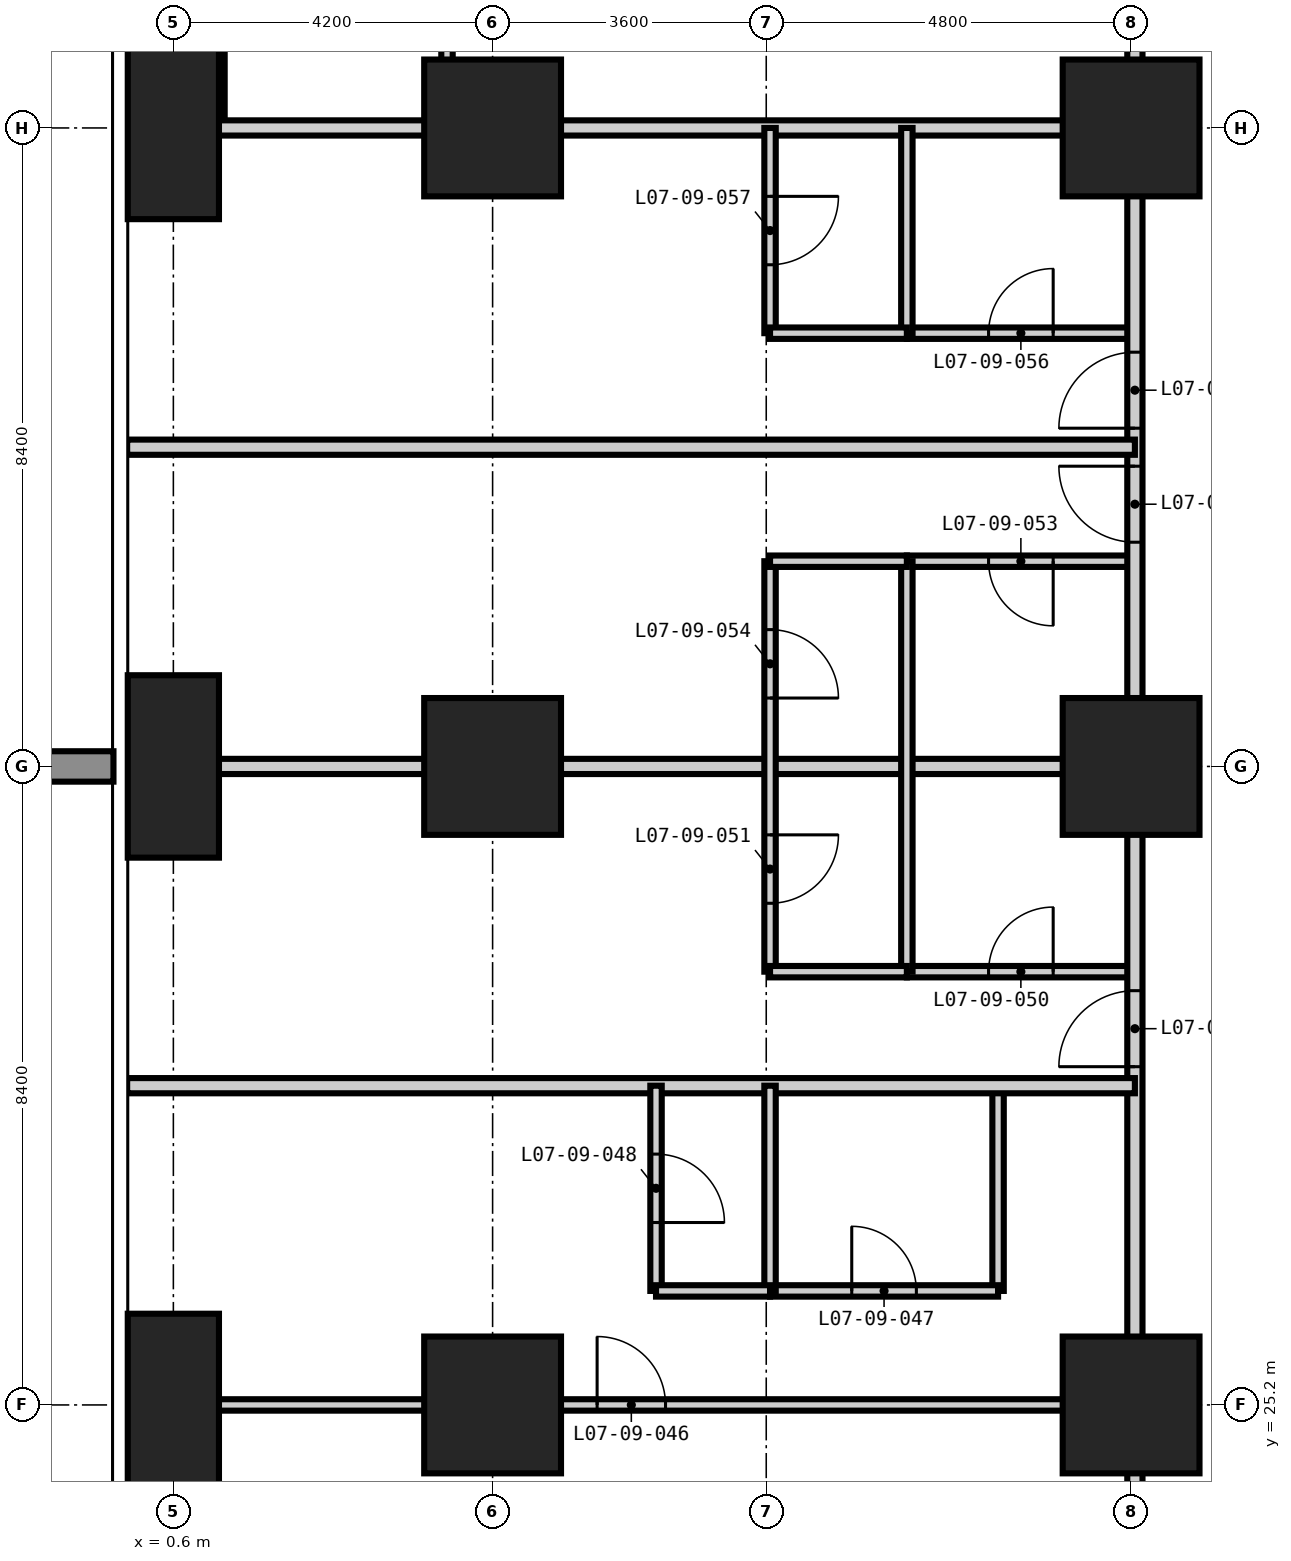
"""IFC4 building model, lengths in metres.
Left out: names, types, materials, properties, quantities, classifications, styles, units other than length and angle.
Written with IfcOpenShell. Run it as: python <this file> out.ifc"""

import sys

from ifc_helpers import new_model, si_unit, direction, frame, frame_2d, origin, origin_2d, place, context, subcontext, project, spatial, rectangle, extrude, element, fill, save


model = new_model("IFC4")
c1 = context("Model", 3, precision=1e-05, world=origin(), true_north=direction((0.0, 1.0)))
c2 = subcontext(c1, "Body", "Model", "MODEL_VIEW")
j1 = project(units=[si_unit("LENGTHUNIT", "METRE"), si_unit("PLANEANGLEUNIT", "RADIAN")], contexts=[c1])
p1 = place(None, origin())
s1 = spatial("IfcSite", under=j1, at=p1, CompositionType="ELEMENT")
p2 = place(p1, origin())
s2 = spatial("IfcBuilding", under=s1, at=p2, CompositionType="ELEMENT")
p3 = place(p2, frame((0.0, 0.0, 34.2)))
s3 = spatial("IfcBuildingStorey", under=s2, at=p3, CompositionType="ELEMENT", Elevation=34.2)
for number, where, z_axis, x_axis in (
    (1, (0.6, 25.2, -0.35), (0.0, 0.0, 1.0), (1.0, 0.0, 0.0)),
    (2, (0.6, 33.6, -0.35), (0.0, 0.0, 1.0), (1.0, 0.0, 0.0)),
    (3, (0.6, 42.0, -0.35), (0.0, 0.0, 1.0), (1.0, 0.0, 0.0)),
):
    element("IfcColumn", number, at=place(p3, frame(where, z_axis=z_axis, x_axis=x_axis)), inside=s3, PredefinedType="COLUMN", context=c2, shape_type="SweptSolid", body=[
        extrude(rectangle(XDim=1.2, YDim=2.4, at=origin_2d()), origin(), (0.0, 0.0, 1.0), 3.6),
    ])
for number, where, z_axis, x_axis in (
    (4, (4.8, 25.2, -0.35), (0.0, 0.0, 1.0), (1.0, 0.0, 0.0)),
    (5, (4.8, 33.6, -0.35), (0.0, 0.0, 1.0), (1.0, 0.0, 0.0)),
    (6, (4.8, 42.0, -0.35), (0.0, 0.0, 1.0), (1.0, 0.0, 0.0)),
    (7, (13.2, 25.2, -0.35), (0.0, 0.0, 1.0), (1.0, 0.0, 0.0)),
    (8, (13.2, 33.6, -0.35), (0.0, 0.0, 1.0), (1.0, 0.0, 0.0)),
    (9, (13.2, 42.0, -0.35), (0.0, 0.0, 1.0), (1.0, 0.0, 0.0)),
):
    element("IfcColumn", number, at=place(p3, frame(where, z_axis=z_axis, x_axis=x_axis)), inside=s3, PredefinedType="COLUMN", context=c2, shape_type="SweptSolid", body=[
        extrude(rectangle(XDim=1.8, YDim=1.8, at=origin_2d()), origin(), (0.0, 0.0, 1.0), 3.6),
    ])
p4 = place(p3, frame((1.2, 42.0, 0.0), z_axis=(0.0, 0.0, 1.0), x_axis=(0.0, 1.0, 0.0)))
e10 = element("IfcWall", 10, at=p4, inside=s3, PredefinedType="PARTITIONING", context=c2, shape_type="SweptSolid", body=[
    extrude(rectangle(XDim=3.6, YDim=0.15, at=frame_2d((1.8, 0.0))), origin(), (0.0, 0.0, 1.0), 3.25),
])
p5 = place(p4, frame((1.375, 0.0, 0.0)))
e11 = element("IfcOpeningElement", 11, at=p5, cuts=e10, PredefinedType="OPENING", context=c2, shape_type="SweptSolid", body=[
    extrude(rectangle(XDim=0.85, YDim=2.1, at=frame_2d((0.425, 1.05))), frame((0.0, 0.085, 0.0), z_axis=(0.0, -1.0, 0.0), x_axis=(1.0, 0.0, 0.0)), (0.0, 0.0, 1.0), 0.17),
])
p6 = place(p3, frame((11.45, 26.7, 0.0), z_axis=(0.0, 0.0, 1.0), x_axis=(0.0, 1.0, 0.0)))
e12 = element("IfcWall", 12, at=p6, inside=s3, PredefinedType="PARTITIONING", context=c2, shape_type="SweptSolid", body=[
    extrude(rectangle(XDim=2.7, YDim=0.15, at=frame_2d((1.35, 0.0))), origin(), (0.0, 0.0, 1.0), 3.25),
])
p7 = place(p3, frame((8.45, 26.7, 0.0), z_axis=(0.0, 0.0, 1.0), x_axis=(1.0, 0.0, 0.0)))
e13 = element("IfcWall", 13, at=p7, inside=s3, PredefinedType="PARTITIONING", context=c2, shape_type="SweptSolid", body=[
    extrude(rectangle(XDim=3.0, YDim=0.15, at=frame_2d((1.5, 0.0))), origin(), (0.0, 0.0, 1.0), 3.25),
])
p8 = place(p7, frame((1.075, 0.0, 0.0)))
e14 = element("IfcOpeningElement", 14, at=p8, cuts=e13, PredefinedType="OPENING", context=c2, shape_type="SweptSolid", body=[
    extrude(rectangle(XDim=0.85, YDim=2.1, at=frame_2d((0.425, 1.05))), frame((0.0, 0.085, 0.0), z_axis=(0.0, -1.0, 0.0), x_axis=(1.0, 0.0, 0.0)), (0.0, 0.0, 1.0), 0.17),
])
p9 = place(p3, frame((10.25, 30.9, 0.0), z_axis=(0.0, 0.0, 1.0), x_axis=(1.0, 0.0, 0.0)))
e15 = element("IfcWall", 15, at=p9, inside=s3, PredefinedType="PARTITIONING", context=c2, shape_type="SweptSolid", body=[
    extrude(rectangle(XDim=3.0, YDim=0.15, at=frame_2d((1.5, 0.0))), origin(), (0.0, 0.0, 1.0), 3.25),
])
p10 = place(p9, frame((1.075, 0.0, 0.0)))
e16 = element("IfcOpeningElement", 16, at=p10, cuts=e15, PredefinedType="OPENING", context=c2, shape_type="SweptSolid", body=[
    extrude(rectangle(XDim=0.85, YDim=2.1, at=frame_2d((0.425, 1.05))), frame((0.0, 0.085, 0.0), z_axis=(0.0, -1.0, 0.0), x_axis=(1.0, 0.0, 0.0)), (0.0, 0.0, 1.0), 0.17),
])
p11 = place(p3, frame((10.25, 36.3, 0.0), z_axis=(0.0, 0.0, 1.0), x_axis=(1.0, 0.0, 0.0)))
e17 = element("IfcWall", 17, at=p11, inside=s3, PredefinedType="PARTITIONING", context=c2, shape_type="SweptSolid", body=[
    extrude(rectangle(XDim=3.0, YDim=0.15, at=frame_2d((1.5, 0.0))), origin(), (0.0, 0.0, 1.0), 3.25),
])
p12 = place(p11, frame((1.075, 0.0, 0.0)))
e18 = element("IfcOpeningElement", 18, at=p12, cuts=e17, PredefinedType="OPENING", context=c2, shape_type="SweptSolid", body=[
    extrude(rectangle(XDim=0.85, YDim=2.1, at=frame_2d((0.425, 1.05))), frame((0.0, 0.085, 0.0), z_axis=(0.0, -1.0, 0.0), x_axis=(1.0, 0.0, 0.0)), (0.0, 0.0, 1.0), 0.17),
])
p13 = place(p3, frame((10.25, 39.3, 0.0), z_axis=(0.0, 0.0, 1.0), x_axis=(1.0, 0.0, 0.0)))
e19 = element("IfcWall", 19, at=p13, inside=s3, PredefinedType="PARTITIONING", context=c2, shape_type="SweptSolid", body=[
    extrude(rectangle(XDim=3.0, YDim=0.15, at=frame_2d((1.5, 0.0))), origin(), (0.0, 0.0, 1.0), 3.25),
])
p14 = place(p13, frame((1.075, 0.0, 0.0)))
e20 = element("IfcOpeningElement", 20, at=p14, cuts=e19, PredefinedType="OPENING", context=c2, shape_type="SweptSolid", body=[
    extrude(rectangle(XDim=0.85, YDim=2.1, at=frame_2d((0.425, 1.05))), frame((0.0, 0.085, 0.0), z_axis=(0.0, -1.0, 0.0), x_axis=(1.0, 0.0, 0.0)), (0.0, 0.0, 1.0), 0.17),
])
p15 = place(p3, frame((13.25, 13.25, 0.0), z_axis=(0.0, 0.0, 1.0), x_axis=(0.0, 1.0, 0.0)))
e21 = element("IfcWall", 21, at=p15, inside=s3, PredefinedType="PARTITIONING", context=c2, shape_type="SweptSolid", body=[
    extrude(rectangle(XDim=32.0, YDim=0.2, at=frame_2d((16.0, 0.0))), origin(), (0.0, 0.0, 1.0), 3.25),
])
p16 = place(p15, frame((9.35, 0.0, 0.0)))
e22 = element("IfcOpeningElement", 22, at=p16, cuts=e21, PredefinedType="OPENING", context=c2, shape_type="SweptSolid", body=[
    extrude(rectangle(XDim=1.0, YDim=2.2, at=frame_2d((0.5, 1.1))), frame((0.0, 0.11, 0.0), z_axis=(0.0, -1.0, 0.0), x_axis=(1.0, 0.0, 0.0)), (0.0, 0.0, 1.0), 0.22),
])
p17 = place(p15, frame((16.4, 0.0, 0.0)))
e23 = element("IfcOpeningElement", 23, at=p17, cuts=e21, PredefinedType="OPENING", context=c2, shape_type="SweptSolid", body=[
    extrude(rectangle(XDim=1.0, YDim=2.2, at=frame_2d((0.5, 1.1))), frame((0.0, 0.11, 0.0), z_axis=(0.0, -1.0, 0.0), x_axis=(1.0, 0.0, 0.0)), (0.0, 0.0, 1.0), 0.22),
])
p18 = place(p15, frame((23.3, 0.0, 0.0)))
e24 = element("IfcOpeningElement", 24, at=p18, cuts=e21, PredefinedType="OPENING", context=c2, shape_type="SweptSolid", body=[
    extrude(rectangle(XDim=1.0, YDim=2.2, at=frame_2d((0.5, 1.1))), frame((0.0, 0.11, 0.0), z_axis=(0.0, -1.0, 0.0), x_axis=(1.0, 0.0, 0.0)), (0.0, 0.0, 1.0), 0.22),
])
p19 = place(p15, frame((24.8, 0.0, 0.0)))
e25 = element("IfcOpeningElement", 25, at=p19, cuts=e21, PredefinedType="OPENING", context=c2, shape_type="SweptSolid", body=[
    extrude(rectangle(XDim=1.0, YDim=2.2, at=frame_2d((0.5, 1.1))), frame((0.0, 0.11, 0.0), z_axis=(0.0, -1.0, 0.0), x_axis=(1.0, 0.0, 0.0)), (0.0, 0.0, 1.0), 0.22),
])
p20 = place(p15, frame((1.275, 0.0, 0.0)))
e26 = element("IfcOpeningElement", 26, at=p20, cuts=e21, PredefinedType="OPENING", context=c2, shape_type="SweptSolid", body=[
    extrude(rectangle(XDim=1.0, YDim=2.2, at=frame_2d((0.5, 1.1))), frame((0.0, 0.11, 0.0), z_axis=(0.0, -1.0, 0.0), x_axis=(1.0, 0.0, 0.0)), (0.0, 0.0, 1.0), 0.22),
])
p21 = place(p15, frame((29.875, 0.0, 0.0)))
e27 = element("IfcOpeningElement", 27, at=p21, cuts=e21, PredefinedType="OPENING", context=c2, shape_type="SweptSolid", body=[
    extrude(rectangle(XDim=1.0, YDim=2.2, at=frame_2d((0.5, 1.1))), frame((0.0, 0.11, 0.0), z_axis=(0.0, -1.0, 0.0), x_axis=(1.0, 0.0, 0.0)), (0.0, 0.0, 1.0), 0.22),
])
for number, where, z_axis, x_axis in (
    (28, (-0.008, 29.4, 0.0), (0.0, 0.0, 1.0), (1.0, 0.0, 0.0)),
    (29, (-0.008, 33.6, 0.0), (0.0, 0.0, 1.0), (1.0, 0.0, 0.0)),
    (30, (-0.008, 37.8, 0.0), (0.0, 0.0, 1.0), (1.0, 0.0, 0.0)),
    (31, (-0.008, 42.0, 0.0), (0.0, 0.0, 1.0), (1.0, 0.0, 0.0)),
):
    element("IfcWall", number, at=place(p3, frame(where, z_axis=z_axis, x_axis=x_axis)), inside=s3, PredefinedType="PARTITIONING", context=c2, shape_type="SweptSolid", body=[
        extrude(rectangle(XDim=13.258, YDim=0.2, at=frame_2d((6.629, 0.0))), origin(), (0.0, 0.0, 1.0), 3.25),
    ])
p22 = place(p3, frame((4.2, 42.0, 0.0), z_axis=(0.0, 0.0, 1.0), x_axis=(0.0, 1.0, 0.0)))
e32 = element("IfcWall", 32, at=p22, inside=s3, PredefinedType="PARTITIONING", context=c2, shape_type="SweptSolid", body=[
    extrude(rectangle(XDim=16.808, YDim=0.15, at=frame_2d((8.404, 0.0))), origin(), (0.0, 0.0, 1.0), 3.25),
])
p23 = place(p22, frame((10.95, 0.0, 0.0)))
e33 = element("IfcOpeningElement", 33, at=p23, cuts=e32, PredefinedType="OPENING", context=c2, shape_type="SweptSolid", body=[
    extrude(rectangle(XDim=0.9, YDim=2.1, at=frame_2d((0.45, 1.05))), frame((0.0, 0.085, 0.0), z_axis=(0.0, -1.0, 0.0), x_axis=(1.0, 0.0, 0.0)), (0.0, 0.0, 1.0), 0.17),
])
p24 = place(p3, frame((6.95, 26.7, 0.0), z_axis=(0.0, 0.0, 1.0), x_axis=(0.0, 1.0, 0.0)))
e34 = element("IfcWall", 34, at=p24, inside=s3, PredefinedType="PARTITIONING", context=c2, shape_type="SweptSolid", body=[
    extrude(rectangle(XDim=2.7, YDim=0.15, at=frame_2d((1.35, 0.0))), origin(), (0.0, 0.0, 1.0), 3.25),
])
p25 = place(p24, frame((0.9, 0.0, 0.0)))
e35 = element("IfcOpeningElement", 35, at=p25, cuts=e34, PredefinedType="OPENING", context=c2, shape_type="SweptSolid", body=[
    extrude(rectangle(XDim=0.9, YDim=2.1, at=frame_2d((0.45, 1.05))), frame((0.0, 0.085, 0.0), z_axis=(0.0, -1.0, 0.0), x_axis=(1.0, 0.0, 0.0)), (0.0, 0.0, 1.0), 0.17),
])
p26 = place(p3, frame((8.45, 26.7, 0.0), z_axis=(0.0, 0.0, 1.0), x_axis=(0.0, 1.0, 0.0)))
e36 = element("IfcWall", 36, at=p26, inside=s3, PredefinedType="PARTITIONING", context=c2, shape_type="SweptSolid", body=[
    extrude(rectangle(XDim=2.7, YDim=0.15, at=frame_2d((1.35, 0.0))), origin(), (0.0, 0.0, 1.0), 3.25),
])
p27 = place(p3, frame((8.45, 30.9, 0.0), z_axis=(0.0, 0.0, 1.0), x_axis=(0.0, 1.0, 0.0)))
e37 = element("IfcWall", 37, at=p27, inside=s3, PredefinedType="PARTITIONING", context=c2, shape_type="SweptSolid", body=[
    extrude(rectangle(XDim=5.4, YDim=0.15, at=frame_2d((2.7, 0.0))), origin(), (0.0, 0.0, 1.0), 3.25),
])
p28 = place(p27, frame((0.9, 0.0, 0.0)))
e38 = element("IfcOpeningElement", 38, at=p28, cuts=e37, PredefinedType="OPENING", context=c2, shape_type="SweptSolid", body=[
    extrude(rectangle(XDim=0.9, YDim=2.1, at=frame_2d((0.45, 1.05))), frame((0.0, 0.085, 0.0), z_axis=(0.0, -1.0, 0.0), x_axis=(1.0, 0.0, 0.0)), (0.0, 0.0, 1.0), 0.17),
])
p29 = place(p27, frame((3.6, 0.0, 0.0)))
e39 = element("IfcOpeningElement", 39, at=p29, cuts=e37, PredefinedType="OPENING", context=c2, shape_type="SweptSolid", body=[
    extrude(rectangle(XDim=0.9, YDim=2.1, at=frame_2d((0.45, 1.05))), frame((0.0, 0.085, 0.0), z_axis=(0.0, -1.0, 0.0), x_axis=(1.0, 0.0, 0.0)), (0.0, 0.0, 1.0), 0.17),
])
p30 = place(p3, frame((8.45, 39.3, 0.0), z_axis=(0.0, 0.0, 1.0), x_axis=(0.0, 1.0, 0.0)))
e40 = element("IfcWall", 40, at=p30, inside=s3, PredefinedType="PARTITIONING", context=c2, shape_type="SweptSolid", body=[
    extrude(rectangle(XDim=2.7, YDim=0.15, at=frame_2d((1.35, 0.0))), origin(), (0.0, 0.0, 1.0), 3.25),
])
p31 = place(p30, frame((0.9, 0.0, 0.0)))
e41 = element("IfcOpeningElement", 41, at=p31, cuts=e40, PredefinedType="OPENING", context=c2, shape_type="SweptSolid", body=[
    extrude(rectangle(XDim=0.9, YDim=2.1, at=frame_2d((0.45, 1.05))), frame((0.0, 0.085, 0.0), z_axis=(0.0, -1.0, 0.0), x_axis=(1.0, 0.0, 0.0)), (0.0, 0.0, 1.0), 0.17),
])
p32 = place(p3, frame((10.25, 30.9, 0.0), z_axis=(0.0, 0.0, 1.0), x_axis=(0.0, 1.0, 0.0)))
e42 = element("IfcWall", 42, at=p32, inside=s3, PredefinedType="PARTITIONING", context=c2, shape_type="SweptSolid", body=[
    extrude(rectangle(XDim=5.4, YDim=0.15, at=frame_2d((2.7, 0.0))), origin(), (0.0, 0.0, 1.0), 3.25),
])
p33 = place(p3, frame((10.25, 39.3, 0.0), z_axis=(0.0, 0.0, 1.0), x_axis=(0.0, 1.0, 0.0)))
e43 = element("IfcWall", 43, at=p33, inside=s3, PredefinedType="PARTITIONING", context=c2, shape_type="SweptSolid", body=[
    extrude(rectangle(XDim=2.7, YDim=0.15, at=frame_2d((1.35, 0.0))), origin(), (0.0, 0.0, 1.0), 3.25),
])
p34 = place(p3, frame((-0.008, 25.2, 0.0), z_axis=(0.0, 0.0, 1.0), x_axis=(1.0, 0.0, 0.0)))
e44 = element("IfcWall", 44, at=p34, inside=s3, PredefinedType="PARTITIONING", context=c2, shape_type="SweptSolid", body=[
    extrude(rectangle(XDim=13.258, YDim=0.15, at=frame_2d((6.629, 0.0))), origin(), (0.0, 0.0, 1.0), 3.25),
])
p35 = place(p34, frame((6.183, 0.0, 0.0)))
e45 = element("IfcOpeningElement", 45, at=p35, cuts=e44, PredefinedType="OPENING", context=c2, shape_type="SweptSolid", body=[
    extrude(rectangle(XDim=0.9, YDim=2.1, at=frame_2d((0.45, 1.05))), frame((0.0, 0.085, 0.0), z_axis=(0.0, -1.0, 0.0), x_axis=(1.0, 0.0, 0.0)), (0.0, 0.0, 1.0), 0.17),
])
p36 = place(p3, frame((6.95, 26.7, 0.0), z_axis=(0.0, 0.0, 1.0), x_axis=(1.0, 0.0, 0.0)))
e46 = element("IfcWall", 46, at=p36, inside=s3, PredefinedType="PARTITIONING", context=c2, shape_type="SweptSolid", body=[
    extrude(rectangle(XDim=1.5, YDim=0.15, at=frame_2d((0.75, 0.0))), origin(), (0.0, 0.0, 1.0), 3.25),
])
for number, where, z_axis, x_axis in (
    (47, (8.45, 30.9, 0.0), (0.0, 0.0, 1.0), (1.0, 0.0, 0.0)),
    (48, (8.45, 36.3, 0.0), (0.0, 0.0, 1.0), (1.0, 0.0, 0.0)),
    (49, (8.45, 39.3, 0.0), (0.0, 0.0, 1.0), (1.0, 0.0, 0.0)),
):
    element("IfcWall", number, at=place(p3, frame(where, z_axis=z_axis, x_axis=x_axis)), inside=s3, PredefinedType="PARTITIONING", context=c2, shape_type="SweptSolid", body=[
        extrude(rectangle(XDim=1.8, YDim=0.15, at=frame_2d((0.9, 0.0))), origin(), (0.0, 0.0, 1.0), 3.25),
    ])
p37 = place(p35, origin())
e50 = element("IfcDoor", 50, at=p37, inside=s3, OperationType="SINGLE_SWING_LEFT", PredefinedType="DOOR", context=c2, shape_type="SweptSolid", body=[
    extrude(rectangle(XDim=0.9, YDim=2.1, at=frame_2d((0.45, 1.05))), frame((0.0, 0.025, 0.0), z_axis=(0.0, -1.0, 0.0), x_axis=(1.0, 0.0, 0.0)), (0.0, 0.0, 1.0), 0.05),
])
fill(e45, e50)
p38 = place(p8, origin())
e51 = element("IfcDoor", 51, at=p38, inside=s3, OperationType="SINGLE_SWING_LEFT", PredefinedType="DOOR", context=c2, shape_type="SweptSolid", body=[
    extrude(rectangle(XDim=0.85, YDim=2.1, at=frame_2d((0.425, 1.05))), frame((0.0, 0.025, 0.0), z_axis=(0.0, -1.0, 0.0), x_axis=(1.0, 0.0, 0.0)), (0.0, 0.0, 1.0), 0.05),
])
fill(e14, e51)
p39 = place(p25, frame((0.9, 0.0, 0.0), z_axis=(0.0, 0.0, 1.0), x_axis=(-1.0, 0.0, 0.0)))
e52 = element("IfcDoor", 52, at=p39, inside=s3, OperationType="SINGLE_SWING_RIGHT", PredefinedType="DOOR", context=c2, shape_type="SweptSolid", body=[
    extrude(rectangle(XDim=0.9, YDim=2.1, at=frame_2d((0.45, 1.05))), frame((0.0, 0.025, 0.0), z_axis=(0.0, -1.0, 0.0), x_axis=(1.0, 0.0, 0.0)), (0.0, 0.0, 1.0), 0.05),
])
fill(e35, e52)
p40 = place(p17, origin())
e53 = element("IfcDoor", 53, at=p40, inside=s3, OperationType="SINGLE_SWING_LEFT", PredefinedType="DOOR", context=c2, shape_type="SweptSolid", body=[
    extrude(rectangle(XDim=1.0, YDim=2.2, at=frame_2d((0.5, 1.1))), frame((0.0, 0.025, 0.0), z_axis=(0.0, -1.0, 0.0), x_axis=(1.0, 0.0, 0.0)), (0.0, 0.0, 1.0), 0.05),
])
fill(e23, e53)
p41 = place(p10, origin())
e54 = element("IfcDoor", 54, at=p41, inside=s3, OperationType="SINGLE_SWING_RIGHT", PredefinedType="DOOR", context=c2, shape_type="SweptSolid", body=[
    extrude(rectangle(XDim=0.85, YDim=2.1, at=frame_2d((0.425, 1.05))), frame((0.0, 0.025, 0.0), z_axis=(0.0, -1.0, 0.0), x_axis=(1.0, 0.0, 0.0)), (0.0, 0.0, 1.0), 0.05),
])
fill(e16, e54)
p42 = place(p28, frame((0.9, 0.0, 0.0), z_axis=(0.0, 0.0, 1.0), x_axis=(-1.0, 0.0, 0.0)))
e55 = element("IfcDoor", 55, at=p42, inside=s3, OperationType="SINGLE_SWING_LEFT", PredefinedType="DOOR", context=c2, shape_type="SweptSolid", body=[
    extrude(rectangle(XDim=0.9, YDim=2.1, at=frame_2d((0.45, 1.05))), frame((0.0, 0.025, 0.0), z_axis=(0.0, -1.0, 0.0), x_axis=(1.0, 0.0, 0.0)), (0.0, 0.0, 1.0), 0.05),
])
fill(e38, e55)
p43 = place(p18, origin())
e56 = element("IfcDoor", 56, at=p43, inside=s3, OperationType="SINGLE_SWING_RIGHT", PredefinedType="DOOR", context=c2, shape_type="SweptSolid", body=[
    extrude(rectangle(XDim=1.0, YDim=2.2, at=frame_2d((0.5, 1.1))), frame((0.0, 0.025, 0.0), z_axis=(0.0, -1.0, 0.0), x_axis=(1.0, 0.0, 0.0)), (0.0, 0.0, 1.0), 0.05),
])
fill(e24, e56)
p44 = place(p12, frame((0.85, 0.0, 0.0), z_axis=(0.0, 0.0, 1.0), x_axis=(-1.0, 0.0, 0.0)))
e57 = element("IfcDoor", 57, at=p44, inside=s3, OperationType="SINGLE_SWING_LEFT", PredefinedType="DOOR", context=c2, shape_type="SweptSolid", body=[
    extrude(rectangle(XDim=0.85, YDim=2.1, at=frame_2d((0.425, 1.05))), frame((0.0, 0.025, 0.0), z_axis=(0.0, -1.0, 0.0), x_axis=(1.0, 0.0, 0.0)), (0.0, 0.0, 1.0), 0.05),
])
fill(e18, e57)
p45 = place(p29, frame((0.9, 0.0, 0.0), z_axis=(0.0, 0.0, 1.0), x_axis=(-1.0, 0.0, 0.0)))
e58 = element("IfcDoor", 58, at=p45, inside=s3, OperationType="SINGLE_SWING_RIGHT", PredefinedType="DOOR", context=c2, shape_type="SweptSolid", body=[
    extrude(rectangle(XDim=0.9, YDim=2.1, at=frame_2d((0.45, 1.05))), frame((0.0, 0.025, 0.0), z_axis=(0.0, -1.0, 0.0), x_axis=(1.0, 0.0, 0.0)), (0.0, 0.0, 1.0), 0.05),
])
fill(e39, e58)
p46 = place(p19, origin())
e59 = element("IfcDoor", 59, at=p46, inside=s3, OperationType="SINGLE_SWING_LEFT", PredefinedType="DOOR", context=c2, shape_type="SweptSolid", body=[
    extrude(rectangle(XDim=1.0, YDim=2.2, at=frame_2d((0.5, 1.1))), frame((0.0, 0.025, 0.0), z_axis=(0.0, -1.0, 0.0), x_axis=(1.0, 0.0, 0.0)), (0.0, 0.0, 1.0), 0.05),
])
fill(e25, e59)
p47 = place(p14, origin())
e60 = element("IfcDoor", 60, at=p47, inside=s3, OperationType="SINGLE_SWING_RIGHT", PredefinedType="DOOR", context=c2, shape_type="SweptSolid", body=[
    extrude(rectangle(XDim=0.85, YDim=2.1, at=frame_2d((0.425, 1.05))), frame((0.0, 0.025, 0.0), z_axis=(0.0, -1.0, 0.0), x_axis=(1.0, 0.0, 0.0)), (0.0, 0.0, 1.0), 0.05),
])
fill(e20, e60)
p48 = place(p31, frame((0.9, 0.0, 0.0), z_axis=(0.0, 0.0, 1.0), x_axis=(-1.0, 0.0, 0.0)))
e61 = element("IfcDoor", 61, at=p48, inside=s3, OperationType="SINGLE_SWING_LEFT", PredefinedType="DOOR", context=c2, shape_type="SweptSolid", body=[
    extrude(rectangle(XDim=0.9, YDim=2.1, at=frame_2d((0.45, 1.05))), frame((0.0, 0.025, 0.0), z_axis=(0.0, -1.0, 0.0), x_axis=(1.0, 0.0, 0.0)), (0.0, 0.0, 1.0), 0.05),
])
fill(e41, e61)
save(model, sys.argv[1])
